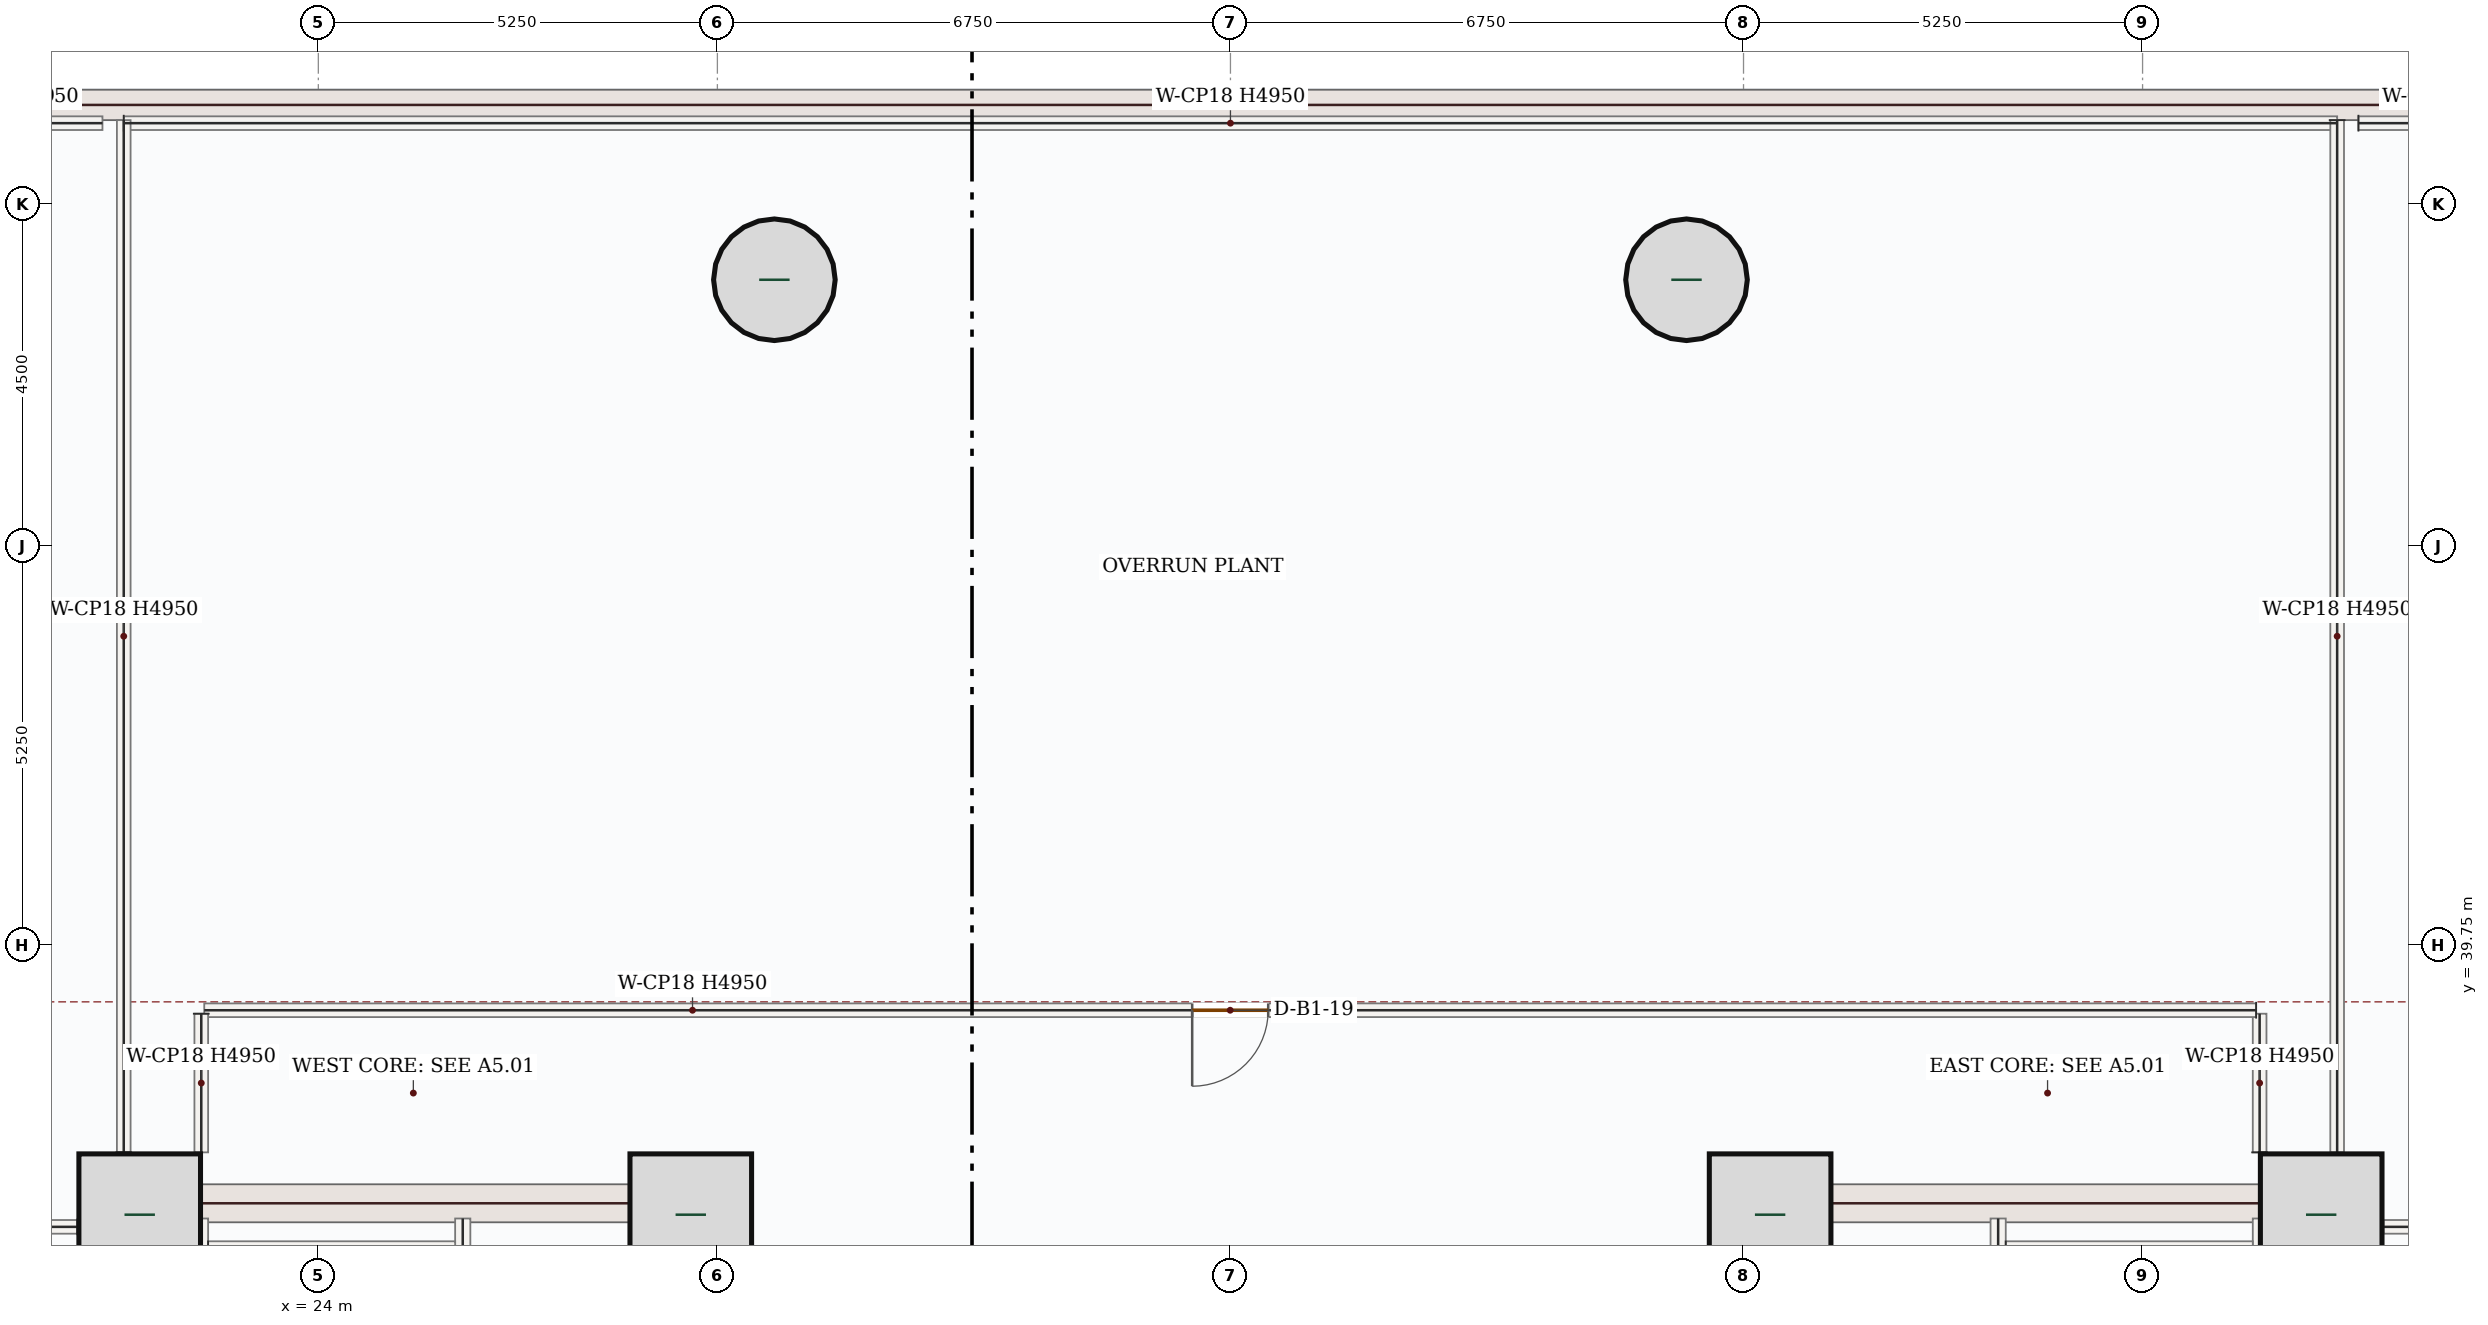
"""IFC4 building model, lengths in metres.
Left out: names, types, materials, properties, quantities, classifications, styles, units other than length and angle.
Written with IfcOpenShell. Run it as: python <this file> out.ifc"""

import sys

from ifc_helpers import new_model, si_unit, direction, frame, frame_2d, origin, origin_2d, place, context, subcontext, project, spatial, rectangle, hollow_circle, extrude, source, transform, mapped, element, fill, save


model = new_model("IFC4")
c1 = context("Model", 3, precision=1e-05, world=origin(), true_north=direction((0.0, 1.0)))
c2 = subcontext(c1, "Body", "Model", "MODEL_VIEW")
j1 = project(units=[si_unit("LENGTHUNIT", "METRE"), si_unit("PLANEANGLEUNIT", "RADIAN")], contexts=[c1])
p1 = place(None, origin())
s1 = spatial("IfcSite", under=j1, at=p1, CompositionType="ELEMENT")
p2 = place(p1, origin())
s2 = spatial("IfcBuilding", under=s1, at=p2, CompositionType="ELEMENT")
p3 = place(p2, frame((0.0, 0.0, -5.4)))
s3 = spatial("IfcBuildingStorey", under=s2, at=p3, CompositionType="ELEMENT", Elevation=-5.4)
m1 = source(origin(), c2, "Body", "SweptSolid", [
    extrude(rectangle(XDim=64.2, YDim=0.4, at=frame_2d((32.1, 0.0))), origin(), (0.0, 0.0, 1.0), 5.05),
])
p4 = place(p3, frame((3.9, 50.8, 0.0), z_axis=(0.0, 0.0, 1.0), x_axis=(1.0, 0.0, 0.0)))
e1 = element("IfcWall", 1, at=p4, inside=s3, PredefinedType="SHEAR", context=c2, shape_type="MappedRepresentation", body=[
    mapped(m1, transform((0.0, 0.0, 0.0), x_axis=(1.0, 0.0, 0.0), y_axis=(0.0, 1.0, 0.0), z_axis=(0.0, 0.0, 1.0), scale=1.0)),
])
m2 = source(origin(), c2, "Body", "SweptSolid", [
    extrude(rectangle(XDim=8.55, YDim=0.5, at=frame_2d((4.275, 0.0))), origin(), (0.0, 0.0, 1.0), 4.95),
])
p5 = place(p3, frame((21.5, 28.05, 0.0), z_axis=(0.0, 0.0, 1.0), x_axis=(0.0, 1.0, 0.0)))
e2 = element("IfcWall", 2, at=p5, inside=s3, PredefinedType="SHEAR", context=c2, shape_type="MappedRepresentation", body=[
    mapped(m2, transform((0.0, 0.0, 0.0), x_axis=(1.0, 0.0, 0.0), y_axis=(0.0, 1.0, 0.0), z_axis=(0.0, 0.0, 1.0), scale=1.0)),
])
p6 = place(p3, frame((29.0, 28.05, 0.0), z_axis=(0.0, 0.0, 1.0), x_axis=(0.0, 1.0, 0.0)))
e3 = element("IfcWall", 3, at=p6, inside=s3, PredefinedType="SHEAR", context=c2, shape_type="SweptSolid", body=[
    extrude(rectangle(XDim=8.55, YDim=0.5, at=frame_2d((4.275, 0.0))), origin(), (0.0, 0.0, 1.0), 4.95),
])
p7 = place(p6, frame((1.5, 0.0, 0.0)))
e4 = element("IfcOpeningElement", 4, at=p7, cuts=e3, PredefinedType="OPENING", context=c2, shape_type="SweptSolid", body=[
    extrude(rectangle(XDim=1.1, YDim=2.2, at=frame_2d((0.55, 1.1))), frame((0.0, 0.26, 0.0), z_axis=(0.0, -1.0, 0.0), x_axis=(1.0, 0.0, 0.0)), (0.0, 0.0, 1.0), 0.52),
])
m3 = source(origin(), c2, "Body", "SweptSolid", [
    extrude(rectangle(XDim=7.0, YDim=0.5, at=frame_2d((3.5, 0.0))), origin(), (0.0, 0.0, 1.0), 4.95),
])
p8 = place(p3, frame((21.75, 36.35, 0.0), z_axis=(0.0, 0.0, 1.0), x_axis=(1.0, 0.0, 0.0)))
e5 = element("IfcWall", 5, at=p8, inside=s3, PredefinedType="SHEAR", context=c2, shape_type="MappedRepresentation", body=[
    mapped(m3, transform((0.0, 0.0, 0.0), x_axis=(1.0, 0.0, 0.0), y_axis=(0.0, 1.0, 0.0), z_axis=(0.0, 0.0, 1.0), scale=1.0)),
])
p9 = place(p3, frame((43.0, 28.05, 0.0), z_axis=(0.0, 0.0, 1.0), x_axis=(0.0, 1.0, 0.0)))
e6 = element("IfcWall", 6, at=p9, inside=s3, PredefinedType="SHEAR", context=c2, shape_type="SweptSolid", body=[
    extrude(rectangle(XDim=8.55, YDim=0.5, at=frame_2d((4.275, 0.0))), origin(), (0.0, 0.0, 1.0), 4.95),
])
p10 = place(p9, frame((1.5, 0.0, 0.0)))
e7 = element("IfcOpeningElement", 7, at=p10, cuts=e6, PredefinedType="OPENING", context=c2, shape_type="SweptSolid", body=[
    extrude(rectangle(XDim=1.1, YDim=2.2, at=frame_2d((0.55, 1.1))), frame((0.0, 0.26, 0.0), z_axis=(0.0, -1.0, 0.0), x_axis=(1.0, 0.0, 0.0)), (0.0, 0.0, 1.0), 0.52),
])
p11 = place(p3, frame((50.5, 28.05, 0.0), z_axis=(0.0, 0.0, 1.0), x_axis=(0.0, 1.0, 0.0)))
e8 = element("IfcWall", 8, at=p11, inside=s3, PredefinedType="SHEAR", context=c2, shape_type="MappedRepresentation", body=[
    mapped(m2, transform((0.0, 0.0, 0.0), x_axis=(1.0, 0.0, 0.0), y_axis=(0.0, 1.0, 0.0), z_axis=(0.0, 0.0, 1.0), scale=1.0)),
])
p12 = place(p3, frame((43.25, 36.35, 0.0), z_axis=(0.0, 0.0, 1.0), x_axis=(1.0, 0.0, 0.0)))
e9 = element("IfcWall", 9, at=p12, inside=s3, PredefinedType="SHEAR", context=c2, shape_type="MappedRepresentation", body=[
    mapped(m3, transform((0.0, 0.0, 0.0), x_axis=(1.0, 0.0, 0.0), y_axis=(0.0, 1.0, 0.0), z_axis=(0.0, 0.0, 1.0), scale=1.0)),
])
m4 = source(origin(), c2, "Body", "SweptSolid", [
    extrude(rectangle(XDim=1.6, YDim=1.6, at=origin_2d()), origin(), (0.0, 0.0, 1.0), 5.4),
])
for number, where, z_axis, x_axis in (
    (10, (21.65, 36.2, 0.0), (0.0, 0.0, 1.0), (1.0, 0.0, 0.0)),
    (11, (28.9, 36.2, 0.0), (0.0, 0.0, 1.0), (1.0, 0.0, 0.0)),
    (12, (43.1, 36.2, 0.0), (0.0, 0.0, 1.0), (1.0, 0.0, 0.0)),
    (13, (50.35, 36.2, 0.0), (0.0, 0.0, 1.0), (1.0, 0.0, 0.0)),
):
    element("IfcColumn", number, at=place(p3, frame(where, z_axis=z_axis, x_axis=x_axis)), inside=s3, PredefinedType="COLUMN", context=c2, shape_type="MappedRepresentation", body=[
        mapped(m4, transform((0.0, 0.0, 0.0), x_axis=(1.0, 0.0, 0.0), y_axis=(0.0, 1.0, 0.0), z_axis=(0.0, 0.0, 1.0), scale=1.0)),
    ])
m5 = source(origin(), c2, "Body", "SweptSolid", [
    extrude(hollow_circle(Radius=0.8, WallThickness=0.06, at=origin_2d()), origin(), (0.0, 0.0, 1.0), 5.4),
])
for number, where, z_axis, x_axis in (
    (14, (30.0, 48.5, 0.0), (0.0, 0.0, 1.0), (1.0, 0.0, 0.0)),
    (15, (42.0, 48.5, 0.0), (0.0, 0.0, 1.0), (1.0, 0.0, 0.0)),
):
    element("IfcColumn", number, at=place(p3, frame(where, z_axis=z_axis, x_axis=x_axis)), inside=s3, PredefinedType="COLUMN", context=c2, shape_type="MappedRepresentation", body=[
        mapped(m5, transform((0.0, 0.0, 0.0), x_axis=(1.0, 0.0, 0.0), y_axis=(0.0, 1.0, 0.0), z_axis=(0.0, 0.0, 1.0), scale=1.0)),
    ])
m6 = source(origin(), c2, "Body", "SweptSolid", [
    extrude(rectangle(XDim=7.87, YDim=0.2, at=frame_2d((3.935, 0.0))), origin(), (0.0, 0.0, 1.0), 4.95),
])
for number, where, z_axis, x_axis in (
    (16, (22.45, 28.28, 0.0), (0.0, 0.0, 1.0), (0.0, 1.0, 0.0)),
    (17, (49.55, 28.28, 0.0), (0.0, 0.0, 1.0), (0.0, 1.0, 0.0)),
):
    element("IfcWall", number, at=place(p3, frame(where, z_axis=z_axis, x_axis=x_axis)), inside=s3, PredefinedType="SOLIDWALL", context=c2, shape_type="MappedRepresentation", body=[
        mapped(m6, transform((0.0, 0.0, 0.0), x_axis=(1.0, 0.0, 0.0), y_axis=(0.0, 1.0, 0.0), z_axis=(0.0, 0.0, 1.0), scale=1.0)),
    ])
p13 = place(p3, frame((25.9, 28.15, 0.0), z_axis=(0.0, 0.0, 1.0), x_axis=(0.0, 1.0, 0.0)))
e18 = element("IfcWall", 18, at=p13, inside=s3, PredefinedType="SOLIDWALL", context=c2, shape_type="SweptSolid", body=[
    extrude(rectangle(XDim=8.0, YDim=0.2, at=frame_2d((4.0, 0.0))), origin(), (0.0, 0.0, 1.0), 4.95),
])
p14 = place(p13, frame((0.4, 0.0, 0.0)))
e19 = element("IfcOpeningElement", 19, at=p14, cuts=e18, PredefinedType="OPENING", context=c2, shape_type="SweptSolid", body=[
    extrude(rectangle(XDim=1.05, YDim=2.15, at=frame_2d((0.525, 1.075))), frame((0.0, 0.11, 0.0), z_axis=(0.0, -1.0, 0.0), x_axis=(1.0, 0.0, 0.0)), (0.0, 0.0, 1.0), 0.22),
])
p15 = place(p3, frame((46.1, 28.15, 0.0), z_axis=(0.0, 0.0, 1.0), x_axis=(0.0, 1.0, 0.0)))
e20 = element("IfcWall", 20, at=p15, inside=s3, PredefinedType="SOLIDWALL", context=c2, shape_type="SweptSolid", body=[
    extrude(rectangle(XDim=8.0, YDim=0.2, at=frame_2d((4.0, 0.0))), origin(), (0.0, 0.0, 1.0), 4.95),
])
p16 = place(p15, frame((0.4, 0.0, 0.0)))
e21 = element("IfcOpeningElement", 21, at=p16, cuts=e20, PredefinedType="OPENING", context=c2, shape_type="SweptSolid", body=[
    extrude(rectangle(XDim=1.05, YDim=2.15, at=frame_2d((0.525, 1.075))), frame((0.0, 0.11, 0.0), z_axis=(0.0, -1.0, 0.0), x_axis=(1.0, 0.0, 0.0)), (0.0, 0.0, 1.0), 0.22),
])
m7 = source(origin(), c2, "Body", "SweptSolid", [
    extrude(rectangle(XDim=3.25, YDim=0.2, at=frame_2d((1.625, 0.0))), origin(), (0.0, 0.0, 1.0), 4.95),
])
for number, where, z_axis, x_axis in (
    (22, (22.55, 35.75, 0.0), (0.0, 0.0, 1.0), (1.0, 0.0, 0.0)),
    (23, (46.2, 35.75, 0.0), (0.0, 0.0, 1.0), (1.0, 0.0, 0.0)),
):
    element("IfcWall", number, at=place(p3, frame(where, z_axis=z_axis, x_axis=x_axis)), inside=s3, PredefinedType="SOLIDWALL", context=c2, shape_type="MappedRepresentation", body=[
        mapped(m7, transform((0.0, 0.0, 0.0), x_axis=(1.0, 0.0, 0.0), y_axis=(0.0, 1.0, 0.0), z_axis=(0.0, 0.0, 1.0), scale=1.0)),
    ])
m8 = source(origin(), c2, "Body", "SweptSolid", [
    extrude(rectangle(XDim=29.12, YDim=0.18, at=frame_2d((14.56, 0.0))), origin(), (0.0, 0.0, 1.0), 4.95),
])
p17 = place(p3, frame((21.44, 50.56, 0.0), z_axis=(0.0, 0.0, 1.0), x_axis=(1.0, 0.0, 0.0)))
e24 = element("IfcWall", 24, at=p17, inside=s3, PredefinedType="PARTITIONING", context=c2, shape_type="MappedRepresentation", body=[
    mapped(m8, transform((0.0, 0.0, 0.0), x_axis=(1.0, 0.0, 0.0), y_axis=(0.0, 1.0, 0.0), z_axis=(0.0, 0.0, 1.0), scale=1.0)),
])
m9 = source(origin(), c2, "Body", "SweptSolid", [
    extrude(rectangle(XDim=13.58, YDim=0.18, at=frame_2d((6.79, 0.0))), origin(), (0.0, 0.0, 1.0), 4.95),
])
p18 = place(p3, frame((50.56, 50.6, 0.0), z_axis=(0.0, 0.0, 1.0), x_axis=(0.0, -1.0, 0.0)))
e25 = element("IfcWall", 25, at=p18, inside=s3, PredefinedType="PARTITIONING", context=c2, shape_type="MappedRepresentation", body=[
    mapped(m9, transform((0.0, 0.0, 0.0), x_axis=(1.0, 0.0, 0.0), y_axis=(0.0, 1.0, 0.0), z_axis=(0.0, 0.0, 1.0), scale=1.0)),
])
m10 = source(origin(), c2, "Body", "SweptSolid", [
    extrude(rectangle(XDim=1.824, YDim=0.18, at=frame_2d((0.912, 0.0))), origin(), (0.0, 0.0, 1.0), 4.95),
])
p19 = place(p3, frame((49.54, 37.02, 0.0), z_axis=(0.0, 0.0, 1.0), x_axis=(0.0, 1.0, 0.0)))
e26 = element("IfcWall", 26, at=p19, inside=s3, PredefinedType="PARTITIONING", context=c2, shape_type="MappedRepresentation", body=[
    mapped(m10, transform((0.0, 0.0, 0.0), x_axis=(1.0, 0.0, 0.0), y_axis=(0.0, 1.0, 0.0), z_axis=(0.0, 0.0, 1.0), scale=1.0)),
])
p20 = place(p3, frame((49.494, 38.89, 0.0), z_axis=(0.0, 0.0, 1.0), x_axis=(-0.999999999836, -1.8087762e-05, 0.0)))
e27 = element("IfcWall", 27, at=p20, inside=s3, PredefinedType="PARTITIONING", context=c2, shape_type="SweptSolid", body=[
    extrude(rectangle(XDim=26.995, YDim=0.18, at=frame_2d((13.498, 0.0))), origin(), (0.0, 0.0, 1.0), 4.95),
])
p21 = place(p20, frame((12.998, 0.0, 0.0)))
e28 = element("IfcOpeningElement", 28, at=p21, cuts=e27, PredefinedType="OPENING", context=c2, shape_type="SweptSolid", body=[
    extrude(rectangle(XDim=1.0, YDim=2.15, at=frame_2d((0.5, 1.075))), frame((0.0, 0.1, 0.0), z_axis=(0.0, -1.0, 0.0), x_axis=(1.0, 0.0, 0.0)), (0.0, 0.0, 1.0), 0.2),
])
p22 = place(p3, frame((22.46, 38.844, 0.0), z_axis=(0.0, 0.0, 1.0), x_axis=(0.0, -1.0, 0.0)))
e29 = element("IfcWall", 29, at=p22, inside=s3, PredefinedType="PARTITIONING", context=c2, shape_type="MappedRepresentation", body=[
    mapped(m10, transform((0.0, 0.0, 0.0), x_axis=(1.0, 0.0, 0.0), y_axis=(0.0, 1.0, 0.0), z_axis=(0.0, 0.0, 1.0), scale=1.0)),
])
p23 = place(p3, frame((21.44, 37.02, 0.0), z_axis=(0.0, 0.0, 1.0), x_axis=(0.0, 1.0, 0.0)))
e30 = element("IfcWall", 30, at=p23, inside=s3, PredefinedType="PARTITIONING", context=c2, shape_type="MappedRepresentation", body=[
    mapped(m9, transform((0.0, 0.0, 0.0), x_axis=(1.0, 0.0, 0.0), y_axis=(0.0, 1.0, 0.0), z_axis=(0.0, 0.0, 1.0), scale=1.0)),
])
m11 = source(origin(), c2, "Body", "SweptSolid", [
    extrude(rectangle(XDim=2.59, YDim=0.18, at=frame_2d((1.295, 0.0))), origin(), (0.0, 0.0, 1.0), 4.95),
])
p24 = place(p3, frame((18.57, 50.56, 0.0), z_axis=(0.0, 0.0, 1.0), x_axis=(1.0, 0.0, 0.0)))
e31 = element("IfcWall", 31, at=p24, inside=s3, PredefinedType="PARTITIONING", context=c2, shape_type="MappedRepresentation", body=[
    mapped(m11, transform((0.0, 0.0, 0.0), x_axis=(1.0, 0.0, 0.0), y_axis=(0.0, 1.0, 0.0), z_axis=(0.0, 0.0, 1.0), scale=1.0)),
])
m12 = source(origin(), c2, "Body", "SweptSolid", [
    extrude(rectangle(XDim=1.726, YDim=0.18, at=frame_2d((0.863, 0.0))), origin(), (0.0, 0.0, 1.0), 3.992),
])
p25 = place(p3, frame((20.83, 36.04, 0.0), z_axis=(0.0, 0.0, 1.0), x_axis=(-1.0, 0.0, 0.0)))
e32 = element("IfcWall", 32, at=p25, inside=s3, PredefinedType="PARTITIONING", context=c2, shape_type="MappedRepresentation", body=[
    mapped(m12, transform((0.0, 0.0, 0.0), x_axis=(1.0, 0.0, 0.0), y_axis=(0.0, 1.0, 0.0), z_axis=(0.0, 0.0, 1.0), scale=1.0)),
])
p26 = place(p3, frame((50.84, 50.56, 0.0), z_axis=(0.0, 0.0, 1.0), x_axis=(1.0, 0.0, 0.0)))
e33 = element("IfcWall", 33, at=p26, inside=s3, PredefinedType="PARTITIONING", context=c2, shape_type="MappedRepresentation", body=[
    mapped(m11, transform((0.0, 0.0, 0.0), x_axis=(1.0, 0.0, 0.0), y_axis=(0.0, 1.0, 0.0), z_axis=(0.0, 0.0, 1.0), scale=1.0)),
])
p27 = place(p3, frame((52.896, 36.04, 0.0), z_axis=(0.0, 0.0, 1.0), x_axis=(-1.0, 0.0, 0.0)))
e34 = element("IfcWall", 34, at=p27, inside=s3, PredefinedType="PARTITIONING", context=c2, shape_type="MappedRepresentation", body=[
    mapped(m12, transform((0.0, 0.0, 0.0), x_axis=(1.0, 0.0, 0.0), y_axis=(0.0, 1.0, 0.0), z_axis=(0.0, 0.0, 1.0), scale=1.0)),
])
m13 = source(origin(), c2, "Body", "SweptSolid", [
    extrude(rectangle(XDim=1.0, YDim=2.15, at=frame_2d((0.5, 1.075))), frame((0.0, 0.025, 0.0), z_axis=(0.0, -1.0, 0.0), x_axis=(1.0, 0.0, 0.0)), (0.0, 0.0, 1.0), 0.05),
])
p28 = place(p21, origin())
e35 = element("IfcDoor", 35, at=p28, inside=s3, OperationType="SINGLE_SWING_RIGHT", PredefinedType="DOOR", context=c2, shape_type="MappedRepresentation", body=[
    mapped(m13, transform((0.0, 0.0, 0.0), x_axis=(1.0, 0.0, 0.0), y_axis=(0.0, 1.0, 0.0), z_axis=(0.0, 0.0, 1.0), scale=1.0)),
])
fill(e28, e35)
save(model, sys.argv[1])
